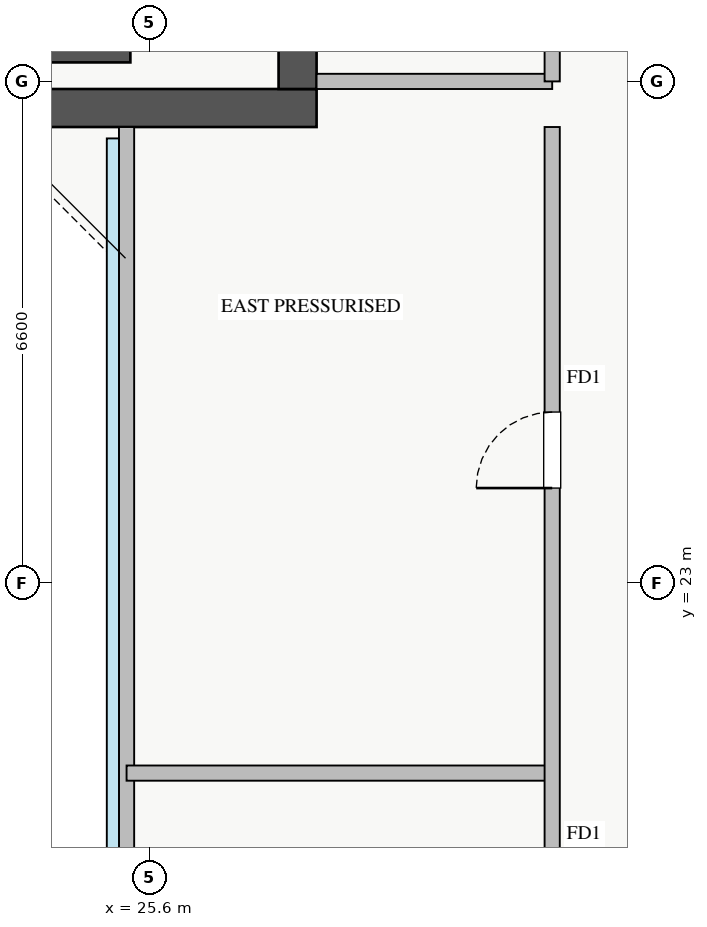
"""IFC4 building model, lengths in metres.
Left out: names, types, materials, properties, quantities, classifications, styles, units other than length and angle.
Written with IfcOpenShell. Run it as: python <this file> out.ifc"""

import sys

from ifc_helpers import new_model, si_unit, direction, frame, frame_2d, origin, place, context, subcontext, project, spatial, rectangle, extrude, source, transform, mapped, element, fill, save


model = new_model("IFC4")
c1 = context("Model", 3, precision=1e-05, world=origin(), true_north=direction((0.0, 1.0)))
c2 = subcontext(c1, "Body", "Model", "MODEL_VIEW")
j1 = project(units=[si_unit("LENGTHUNIT", "METRE"), si_unit("PLANEANGLEUNIT", "RADIAN")], contexts=[c1])
p1 = place(None, origin())
s1 = spatial("IfcSite", under=j1, at=p1, CompositionType="ELEMENT")
p2 = place(p1, origin())
s2 = spatial("IfcBuilding", under=s1, at=p2, CompositionType="ELEMENT")
p3 = place(p2, frame((0.0, 0.0, 232.75)))
s3 = spatial("IfcBuildingStorey", under=s2, at=p3, CompositionType="ELEMENT", Elevation=232.75)
p4 = place(p3, frame((18.2, 29.95, 0.0), z_axis=(0.0, 0.0, 1.0), x_axis=(1.0, 0.0, 0.0)))
e1 = element("IfcWall", 1, at=p4, inside=s3, PredefinedType="SHEAR", context=c2, shape_type="SweptSolid", body=[
    extrude(rectangle(XDim=7.15, YDim=0.2, at=frame_2d((3.575, 0.0))), origin(), (0.0, 0.0, 1.0), 4.5),
])
p5 = place(p3, frame((10.2, 29.25, 0.0), z_axis=(0.0, 0.0, 1.0), x_axis=(1.0, 0.0, 0.0)))
e2 = element("IfcWall", 2, at=p5, inside=s3, PredefinedType="SHEAR", context=c2, shape_type="SweptSolid", body=[
    extrude(rectangle(XDim=17.6, YDim=0.5, at=frame_2d((8.8, 0.0))), origin(), (0.0, 0.0, 1.0), 4.5),
])
p6 = place(p3, frame((27.55, 29.5, 0.0), z_axis=(0.0, 0.0, 1.0), x_axis=(0.0, 1.0, 0.0)))
e3 = element("IfcWall", 3, at=p6, inside=s3, PredefinedType="SHEAR", context=c2, shape_type="SweptSolid", body=[
    extrude(rectangle(XDim=6.2, YDim=0.5, at=frame_2d((3.1, 0.0))), origin(), (0.0, 0.0, 1.0), 4.5),
])
p7 = place(p6, frame((1.1, 0.0, 0.0)))
e4 = element("IfcOpeningElement", 4, at=p7, cuts=e3, PredefinedType="OPENING", context=c2, shape_type="SweptSolid", body=[
    extrude(rectangle(XDim=1.3, YDim=2.05, at=frame_2d((0.65, 1.025))), frame((0.0, 0.26, 0.0), z_axis=(0.0, -1.0, 0.0), x_axis=(1.0, 0.0, 0.0)), (0.0, 0.0, 1.0), 0.52),
])
p8 = place(p3, frame((27.8, 29.6, 0.0), z_axis=(0.0, 0.0, 1.0), x_axis=(1.0, 0.0, 0.0)))
e5 = element("IfcWall", 5, at=p8, inside=s3, PredefinedType="PARTITIONING", context=c2, shape_type="SweptSolid", body=[
    extrude(rectangle(XDim=3.1, YDim=0.2, at=frame_2d((1.55, 0.0))), origin(), (0.0, 0.0, 1.0), 4.32),
])
p9 = place(p3, frame((30.9, 29.6, 0.0), z_axis=(0.0, 0.0, 1.0), x_axis=(0.0, 1.0, 0.0)))
e6 = element("IfcWall", 6, at=p9, inside=s3, PredefinedType="PARTITIONING", context=c2, shape_type="SweptSolid", body=[
    extrude(rectangle(XDim=3.9, YDim=0.2, at=frame_2d((1.95, 0.0))), origin(), (0.0, 0.0, 1.0), 4.32),
])
p10 = place(p9, frame((1.4, 0.0, 0.0)))
e7 = element("IfcOpeningElement", 7, at=p10, cuts=e6, PredefinedType="OPENING", context=c2, shape_type="SweptSolid", body=[
    extrude(rectangle(XDim=1.1, YDim=2.05, at=frame_2d((0.55, 1.025))), frame((0.0, 0.11, 0.0), z_axis=(0.0, -1.0, 0.0), x_axis=(1.0, 0.0, 0.0)), (0.0, 0.0, 1.0), 0.22),
])
p11 = place(p3, frame((25.3, 17.0, 0.0), z_axis=(0.0, 0.0, 1.0), x_axis=(0.0, 1.0, 0.0)))
e8 = element("IfcWall", 8, at=p11, inside=s3, PredefinedType="PARTITIONING", context=c2, shape_type="SweptSolid", body=[
    extrude(rectangle(XDim=12.0, YDim=0.2, at=frame_2d((6.0, 0.0))), origin(), (0.0, 0.0, 1.0), 2.515),
])
p12 = place(p3, frame((25.3, 20.5, 0.0), z_axis=(0.0, 0.0, 1.0), x_axis=(1.0, 0.0, 0.0)))
e9 = element("IfcWall", 9, at=p12, inside=s3, PredefinedType="PARTITIONING", context=c2, shape_type="SweptSolid", body=[
    extrude(rectangle(XDim=5.6, YDim=0.2, at=frame_2d((2.8, 0.0))), origin(), (0.0, 0.0, 1.0), 4.32),
])
p13 = place(p3, frame((30.9, 17.0, 0.0), z_axis=(0.0, 0.0, 1.0), x_axis=(0.0, 1.0, 0.0)))
e10 = element("IfcWall", 10, at=p13, inside=s3, PredefinedType="PARTITIONING", context=c2, shape_type="SweptSolid", body=[
    extrude(rectangle(XDim=12.0, YDim=0.2, at=frame_2d((6.0, 0.0))), origin(), (0.0, 0.0, 1.0), 4.32),
])
p14 = place(p13, frame((1.25, 0.0, 0.0)))
e11 = element("IfcOpeningElement", 11, at=p14, cuts=e10, PredefinedType="OPENING", context=c2, shape_type="SweptSolid", body=[
    extrude(rectangle(XDim=1.0, YDim=2.05, at=frame_2d((0.5, 1.025))), frame((0.0, 0.11, 0.0), z_axis=(0.0, -1.0, 0.0), x_axis=(1.0, 0.0, 0.0)), (0.0, 0.0, 1.0), 0.22),
])
p15 = place(p13, frame((7.25, 0.0, 0.0)))
e12 = element("IfcOpeningElement", 12, at=p15, cuts=e10, PredefinedType="OPENING", context=c2, shape_type="SweptSolid", body=[
    extrude(rectangle(XDim=1.0, YDim=2.05, at=frame_2d((0.5, 1.025))), frame((0.0, 0.11, 0.0), z_axis=(0.0, -1.0, 0.0), x_axis=(1.0, 0.0, 0.0)), (0.0, 0.0, 1.0), 0.22),
])
m1 = source(origin(), c2, "Body", "SweptSolid", [
    extrude(rectangle(XDim=1.0, YDim=2.05, at=frame_2d((0.5, 1.025))), frame((0.0, 0.025, 0.0), z_axis=(0.0, -1.0, 0.0), x_axis=(1.0, 0.0, 0.0)), (0.0, 0.0, 1.0), 0.05),
])
p16 = place(p15, origin())
e13 = element("IfcDoor", 13, at=p16, inside=s3, OperationType="SINGLE_SWING_LEFT", PredefinedType="DOOR", context=c2, shape_type="MappedRepresentation", body=[
    mapped(m1, transform((0.0, 0.0, 0.0), x_axis=(1.0, 0.0, 0.0), y_axis=(0.0, 1.0, 0.0), z_axis=(0.0, 0.0, 1.0), scale=1.0)),
])
fill(e12, e13)
save(model, sys.argv[1])
